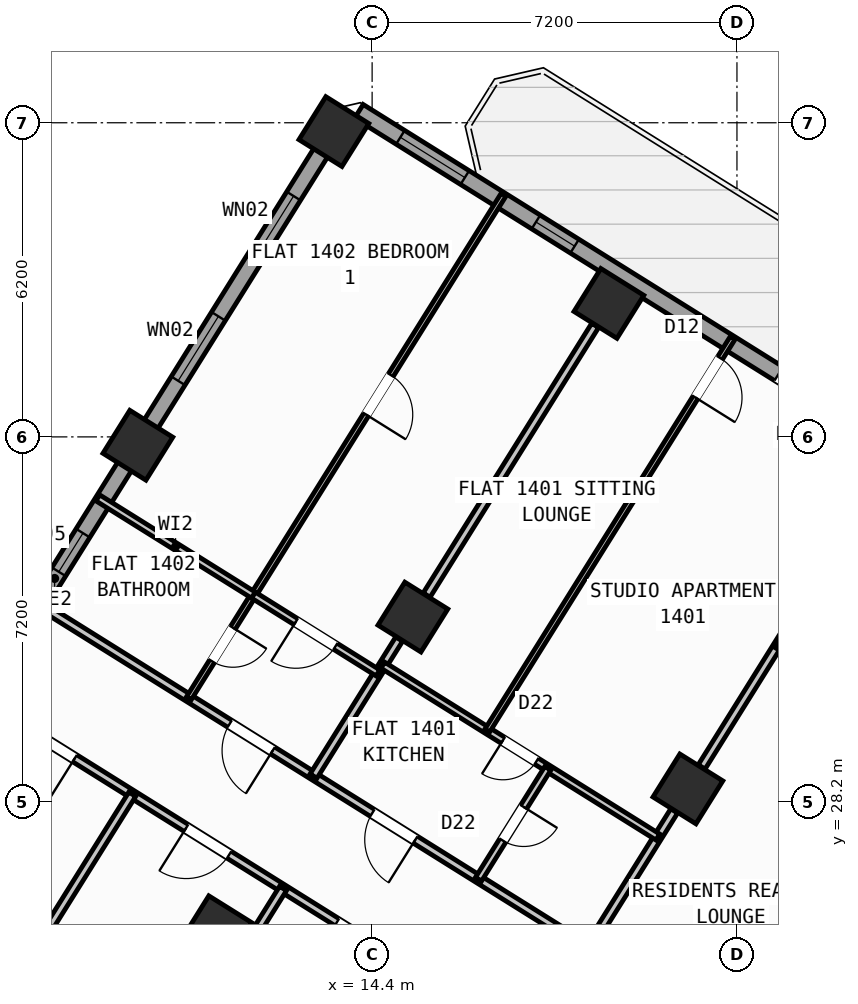
"""IFC4 building model, lengths in metres.
Left out: names, types, materials, properties, quantities, classifications, styles, units other than length and angle.
Written with IfcOpenShell. Run it as: python <this file> out.ifc"""

import sys

from ifc_helpers import new_model, si_unit, direction, frame, frame_2d, origin, origin_2d, place, context, subcontext, project, spatial, rectangle, hollow_rectangle, extrude, source, transform, mapped, element, fill, save


model = new_model("IFC4")
c1 = context("Model", 3, precision=1e-05, world=origin(), true_north=direction((0.0, 1.0)))
c2 = subcontext(c1, "Body", "Model", "MODEL_VIEW")
j1 = project(units=[si_unit("LENGTHUNIT", "METRE"), si_unit("PLANEANGLEUNIT", "RADIAN")], contexts=[c1])
p1 = place(None, origin())
s1 = spatial("IfcSite", under=j1, at=p1, CompositionType="ELEMENT")
p2 = place(p1, origin())
s2 = spatial("IfcBuilding", under=s1, at=p2, CompositionType="ELEMENT")
p3 = place(p2, frame((0.0, 0.0, 56.4)))
s3 = spatial("IfcBuildingStorey", under=s2, at=p3, CompositionType="ELEMENT", Elevation=56.4)
m1 = source(origin(), c2, "Body", "SweptSolid", [
    extrude(hollow_rectangle(XDim=1.0, YDim=1.0, WallThickness=0.04, at=origin_2d()), origin(), (0.0, 0.0, 1.0), 3.6),
])
for number, where, z_axis, x_axis in (
    (1, (20.632, 28.452, 0.0), (0.0, 0.0, 1.0), (-0.848, 0.53, 0.0)),
    (2, (19.073, 38.034, 0.0), (0.0, 0.0, 1.0), (-0.848, 0.53, 0.0)),
    (3, (15.205, 31.844, 0.0), (0.0, 0.0, 1.0), (-0.848, 0.53, 0.0)),
    (4, (11.336, 25.653, 0.0), (0.0, 0.0, 1.0), (-0.848, 0.53, 0.0)),
    (5, (13.646, 41.426, 0.0), (0.0, 0.0, 1.0), (-0.848, 0.53, 0.0)),
    (6, (9.777, 35.235, 0.0), (0.0, 0.0, 1.0), (-0.848, 0.53, 0.0)),
):
    element("IfcColumn", number, at=place(p3, frame(where, z_axis=z_axis, x_axis=x_axis)), inside=s3, PredefinedType="COLUMN", context=c2, shape_type="MappedRepresentation", body=[
        mapped(m1, transform((0.0, 0.0, 0.0), scale=1.0)),
    ])
p4 = place(p3, frame((2.415, 23.452, 0.0), z_axis=(0.0, 0.0, 1.0), x_axis=(0.52991049553, 0.848053575387, 0.0)))
e7 = element("IfcWall", 7, at=p4, inside=s3, PredefinedType="STANDARD", context=c2, shape_type="SweptSolid", body=[
    extrude(rectangle(XDim=21.587, YDim=0.32, at=frame_2d((10.794, 0.0))), origin(), (0.0, 0.0, 1.0), 2.725),
])
p5 = place(p4, frame((2.356, 0.0, 0.8)))
e8 = element("IfcOpeningElement", 8, at=p5, cuts=e7, PredefinedType="OPENING", context=c2, shape_type="SweptSolid", body=[
    extrude(rectangle(XDim=2.1, YDim=1.55, at=frame_2d((1.05, 0.775))), frame((0.0, 0.17, 0.0), z_axis=(0.0, -1.0, 0.0), x_axis=(1.0, 0.0, 0.0)), (0.0, 0.0, 1.0), 0.34),
])
p6 = place(p4, frame((10.949, 0.0, 1.0)))
e9 = element("IfcOpeningElement", 9, at=p6, cuts=e7, PredefinedType="OPENING", context=c2, shape_type="SweptSolid", body=[
    extrude(rectangle(XDim=0.9, YDim=1.25, at=frame_2d((0.45, 0.625))), frame((0.0, 0.17, 0.0), z_axis=(0.0, -1.0, 0.0), x_axis=(1.0, 0.0, 0.0)), (0.0, 0.0, 1.0), 0.34),
])
p7 = place(p4, frame((15.394, 0.0, 0.85)))
e10 = element("IfcOpeningElement", 10, at=p7, cuts=e7, PredefinedType="OPENING", context=c2, shape_type="SweptSolid", body=[
    extrude(rectangle(XDim=1.5, YDim=1.5, at=frame_2d((0.75, 0.75))), frame((0.0, 0.17, 0.0), z_axis=(0.0, -1.0, 0.0), x_axis=(1.0, 0.0, 0.0)), (0.0, 0.0, 1.0), 0.34),
])
p8 = place(p4, frame((18.194, 0.0, 0.85)))
e11 = element("IfcOpeningElement", 11, at=p8, cuts=e7, PredefinedType="OPENING", context=c2, shape_type="SweptSolid", body=[
    extrude(rectangle(XDim=1.5, YDim=1.5, at=frame_2d((0.75, 0.75))), frame((0.0, 0.17, 0.0), z_axis=(0.0, -1.0, 0.0), x_axis=(1.0, 0.0, 0.0)), (0.0, 0.0, 1.0), 0.34),
])
p9 = place(p3, frame((14.138, 41.825, 0.0), z_axis=(0.0, 0.0, 1.0), x_axis=(0.848046498049, -0.529921821731, 0.0)))
e12 = element("IfcWall", 12, at=p9, inside=s3, PredefinedType="STANDARD", context=c2, shape_type="SweptSolid", body=[
    extrude(rectangle(XDim=31.588, YDim=0.32, at=frame_2d((15.794, 0.0))), origin(), (0.0, 0.0, 1.0), 3.35),
])
p10 = place(p9, frame((9.772, 0.0, 0.0)))
e13 = element("IfcOpeningElement", 13, at=p10, cuts=e12, PredefinedType="OPENING", context=c2, shape_type="SweptSolid", body=[
    extrude(rectangle(XDim=1.05, YDim=2.15, at=frame_2d((0.525, 1.075))), frame((0.0, 0.17, 0.0), z_axis=(0.0, -1.0, 0.0), x_axis=(1.0, 0.0, 0.0)), (0.0, 0.0, 1.0), 0.34),
])
p11 = place(p9, frame((0.966, 0.0, 0.85)))
e14 = element("IfcOpeningElement", 14, at=p11, cuts=e12, PredefinedType="OPENING", context=c2, shape_type="SweptSolid", body=[
    extrude(rectangle(XDim=1.5, YDim=1.5, at=frame_2d((0.75, 0.75))), frame((0.0, 0.17, 0.0), z_axis=(0.0, -1.0, 0.0), x_axis=(1.0, 0.0, 0.0)), (0.0, 0.0, 1.0), 0.34),
])
p12 = place(p9, frame((4.121, 0.0, 1.0)))
e15 = element("IfcOpeningElement", 15, at=p12, cuts=e12, PredefinedType="OPENING", context=c2, shape_type="SweptSolid", body=[
    extrude(rectangle(XDim=0.9, YDim=1.25, at=frame_2d((0.45, 0.625))), frame((0.0, 0.17, 0.0), z_axis=(0.0, -1.0, 0.0), x_axis=(1.0, 0.0, 0.0)), (0.0, 0.0, 1.0), 0.34),
])
p13 = place(p9, frame((13.899, 0.0, 0.85)))
e16 = element("IfcOpeningElement", 16, at=p13, cuts=e12, PredefinedType="OPENING", context=c2, shape_type="SweptSolid", body=[
    extrude(rectangle(XDim=1.5, YDim=1.5, at=frame_2d((0.75, 0.75))), frame((0.0, 0.17, 0.0), z_axis=(0.0, -1.0, 0.0), x_axis=(1.0, 0.0, 0.0)), (0.0, 0.0, 1.0), 0.34),
])
p14 = place(p9, frame((22.019, 0.0, 0.95)))
e17 = element("IfcOpeningElement", 17, at=p14, cuts=e12, PredefinedType="OPENING", context=c2, shape_type="SweptSolid", body=[
    extrude(rectangle(XDim=1.2, YDim=1.4, at=frame_2d((0.6, 0.7))), frame((0.0, 0.17, 0.0), z_axis=(0.0, -1.0, 0.0), x_axis=(1.0, 0.0, 0.0)), (0.0, 0.0, 1.0), 0.34),
])
p15 = place(p9, frame((27.569, 0.0, 0.95)))
e18 = element("IfcOpeningElement", 18, at=p15, cuts=e12, PredefinedType="OPENING", context=c2, shape_type="SweptSolid", body=[
    extrude(rectangle(XDim=1.2, YDim=1.4, at=frame_2d((0.6, 0.7))), frame((0.0, 0.17, 0.0), z_axis=(0.0, -1.0, 0.0), x_axis=(1.0, 0.0, 0.0)), (0.0, 0.0, 1.0), 0.34),
])
p16 = place(p3, frame((27.953, 33.016, 0.0), z_axis=(0.0, 0.0, 1.0), x_axis=(-0.529905022231, -0.848056995381, 0.0)))
e19 = element("IfcWall", 19, at=p16, inside=s3, PredefinedType="PARTITIONING", context=c2, shape_type="SweptSolid", body=[
    extrude(rectangle(XDim=11.45, YDim=0.16, at=frame_2d((5.725, 0.0))), origin(), (0.0, 0.0, 1.0), 3.34),
])
p17 = place(p3, frame((21.885, 23.306, 0.0), z_axis=(0.0, 0.0, 1.0), x_axis=(-0.848052408131, 0.529912363569, 0.0)))
e20 = element("IfcWall", 20, at=p17, inside=s3, PredefinedType="PARTITIONING", context=c2, shape_type="SweptSolid", body=[
    extrude(rectangle(XDim=16.73, YDim=0.16, at=frame_2d((8.365, 0.0))), origin(), (0.0, 0.0, 1.0), 3.34),
])
p18 = place(p17, frame((1.395, 0.0, 0.0)))
e21 = element("IfcOpeningElement", 21, at=p18, cuts=e20, PredefinedType="OPENING", context=c2, shape_type="SweptSolid", body=[
    extrude(rectangle(XDim=1.0, YDim=2.1, at=frame_2d((0.5, 1.05))), frame((0.0, 0.09, 0.0), z_axis=(0.0, -1.0, 0.0), x_axis=(1.0, 0.0, 0.0)), (0.0, 0.0, 1.0), 0.18),
])
p19 = place(p17, frame((7.82, 0.0, 0.0)))
e22 = element("IfcOpeningElement", 22, at=p19, cuts=e20, PredefinedType="OPENING", context=c2, shape_type="SweptSolid", body=[
    extrude(rectangle(XDim=1.0, YDim=2.1, at=frame_2d((0.5, 1.05))), frame((0.0, 0.09, 0.0), z_axis=(0.0, -1.0, 0.0), x_axis=(1.0, 0.0, 0.0)), (0.0, 0.0, 1.0), 0.18),
])
p20 = place(p17, frame((11.14, 0.0, 0.0)))
e23 = element("IfcOpeningElement", 23, at=p20, cuts=e20, PredefinedType="OPENING", context=c2, shape_type="SweptSolid", body=[
    extrude(rectangle(XDim=1.0, YDim=2.1, at=frame_2d((0.5, 1.05))), frame((0.0, 0.09, 0.0), z_axis=(0.0, -1.0, 0.0), x_axis=(1.0, 0.0, 0.0)), (0.0, 0.0, 1.0), 0.18),
])
p21 = place(p3, frame((20.719, 21.44, 0.0), z_axis=(0.0, 0.0, 1.0), x_axis=(-0.848048310262, 0.529918921593, 0.0)))
e24 = element("IfcWall", 24, at=p21, inside=s3, PredefinedType="PARTITIONING", context=c2, shape_type="SweptSolid", body=[
    extrude(rectangle(XDim=16.73, YDim=0.16, at=frame_2d((8.365, 0.0))), origin(), (0.0, 0.0, 1.0), 3.34),
])
p22 = place(p21, frame((0.92, 0.0, 0.0)))
e25 = element("IfcOpeningElement", 25, at=p22, cuts=e24, PredefinedType="OPENING", context=c2, shape_type="SweptSolid", body=[
    extrude(rectangle(XDim=1.0, YDim=2.1, at=frame_2d((0.5, 1.05))), frame((0.0, 0.09, 0.0), z_axis=(0.0, -1.0, 0.0), x_axis=(1.0, 0.0, 0.0)), (0.0, 0.0, 1.0), 0.18),
])
p23 = place(p21, frame((4.408, 0.0, 0.0)))
e26 = element("IfcOpeningElement", 26, at=p23, cuts=e24, PredefinedType="OPENING", context=c2, shape_type="SweptSolid", body=[
    extrude(rectangle(XDim=1.0, YDim=2.1, at=frame_2d((0.5, 1.05))), frame((0.0, 0.09, 0.0), z_axis=(0.0, -1.0, 0.0), x_axis=(1.0, 0.0, 0.0)), (0.0, 0.0, 1.0), 0.18),
])
p24 = place(p21, frame((7.271, 0.0, 0.0)))
e27 = element("IfcOpeningElement", 27, at=p24, cuts=e24, PredefinedType="OPENING", context=c2, shape_type="SweptSolid", body=[
    extrude(rectangle(XDim=1.0, YDim=2.1, at=frame_2d((0.5, 1.05))), frame((0.0, 0.09, 0.0), z_axis=(0.0, -1.0, 0.0), x_axis=(1.0, 0.0, 0.0)), (0.0, 0.0, 1.0), 0.18),
])
p25 = place(p21, frame((10.78, 0.0, 0.0)))
e28 = element("IfcOpeningElement", 28, at=p25, cuts=e24, PredefinedType="OPENING", context=c2, shape_type="SweptSolid", body=[
    extrude(rectangle(XDim=1.0, YDim=2.1, at=frame_2d((0.5, 1.05))), frame((0.0, 0.09, 0.0), z_axis=(0.0, -1.0, 0.0), x_axis=(1.0, 0.0, 0.0)), (0.0, 0.0, 1.0), 0.18),
])
p26 = place(p21, frame((14.372, 0.0, 0.0)))
e29 = element("IfcOpeningElement", 29, at=p26, cuts=e24, PredefinedType="OPENING", context=c2, shape_type="SweptSolid", body=[
    extrude(rectangle(XDim=1.0, YDim=2.1, at=frame_2d((0.5, 1.05))), frame((0.0, 0.09, 0.0), z_axis=(0.0, -1.0, 0.0), x_axis=(1.0, 0.0, 0.0)), (0.0, 0.0, 1.0), 0.18),
])
p27 = place(p3, frame((12.642, 26.488, 0.0), z_axis=(0.0, 0.0, 1.0), x_axis=(-0.529914428959, -0.848051117552, 0.0)))
e30 = element("IfcWall", 30, at=p27, inside=s3, PredefinedType="PARTITIONING", context=c2, shape_type="SweptSolid", body=[
    extrude(rectangle(XDim=8.05, YDim=0.16, at=frame_2d((4.025, 0.0))), origin(), (0.0, 0.0, 1.0), 3.34),
])
p28 = place(p3, frame((9.666, 28.347, 0.0), z_axis=(0.0, 0.0, 1.0), x_axis=(-0.529928058306, -0.848042600947, 0.0)))
e31 = element("IfcWall", 31, at=p28, inside=s3, PredefinedType="PARTITIONING", context=c2, shape_type="SweptSolid", body=[
    extrude(rectangle(XDim=8.05, YDim=0.16, at=frame_2d((4.025, 0.0))), origin(), (0.0, 0.0, 1.0), 3.34),
])
p29 = place(p3, frame((24.229, 34.209, 0.0), z_axis=(0.0, 0.0, 1.0), x_axis=(-0.529897533635, -0.848061674554, 0.0)))
e32 = element("IfcWall", 32, at=p29, inside=s3, PredefinedType="PARTITIONING", context=c2, shape_type="SweptSolid", body=[
    extrude(rectangle(XDim=6.276, YDim=0.16, at=frame_2d((3.138, 0.0))), origin(), (0.0, 0.0, 1.0), 2.725),
])
p30 = place(p3, frame((20.361, 28.018, 0.0), z_axis=(0.0, 0.0, 1.0), x_axis=(-0.529875025416, -0.848075738033, 0.0)))
e33 = element("IfcWall", 33, at=p30, inside=s3, PredefinedType="PARTITIONING", context=c2, shape_type="SweptSolid", body=[
    extrude(rectangle(XDim=3.188, YDim=0.16, at=frame_2d((1.594, 0.0))), origin(), (0.0, 0.0, 1.0), 2.725),
])
p31 = place(p3, frame((25.612, 29.269, 0.0), z_axis=(0.0, 0.0, 1.0), x_axis=(-0.84803087207, 0.529946827537, 0.0)))
e34 = element("IfcWall", 34, at=p31, inside=s3, PredefinedType="PARTITIONING", context=c2, shape_type="SweptSolid", body=[
    extrude(rectangle(XDim=3.79, YDim=0.11, at=frame_2d((1.895, 0.0))), origin(), (0.0, 0.0, 1.0), 3.34),
])
p32 = place(p31, frame((1.435, 0.0, 0.0)))
e35 = element("IfcOpeningElement", 35, at=p32, cuts=e34, PredefinedType="OPENING", context=c2, shape_type="SweptSolid", body=[
    extrude(rectangle(XDim=0.92, YDim=2.08, at=frame_2d((0.46, 1.04))), frame((0.0, 0.065, 0.0), z_axis=(0.0, -1.0, 0.0), x_axis=(1.0, 0.0, 0.0)), (0.0, 0.0, 1.0), 0.13),
])
p33 = place(p3, frame((18.802, 37.6, 0.0), z_axis=(0.0, 0.0, 1.0), x_axis=(-0.529915015264, -0.848050751193, 0.0)))
e36 = element("IfcWall", 36, at=p33, inside=s3, PredefinedType="PARTITIONING", context=c2, shape_type="SweptSolid", body=[
    extrude(rectangle(XDim=6.276, YDim=0.16, at=frame_2d((3.138, 0.0))), origin(), (0.0, 0.0, 1.0), 2.725),
])
p34 = place(p3, frame((14.933, 31.409, 0.0), z_axis=(0.0, 0.0, 1.0), x_axis=(-0.529875025416, -0.848075738033, 0.0)))
e37 = element("IfcWall", 37, at=p34, inside=s3, PredefinedType="PARTITIONING", context=c2, shape_type="SweptSolid", body=[
    extrude(rectangle(XDim=3.188, YDim=0.16, at=frame_2d((1.594, 0.0))), origin(), (0.0, 0.0, 1.0), 2.725),
])
p35 = place(p3, frame((20.039, 27.502, 0.0), z_axis=(0.0, 0.0, 1.0), x_axis=(-0.848039019877, 0.529933789039, 0.0)))
e38 = element("IfcWall", 38, at=p35, inside=s3, PredefinedType="PLUMBINGWALL", context=c2, shape_type="SweptSolid", body=[
    extrude(rectangle(XDim=6.4, YDim=0.14, at=frame_2d((3.2, 0.0))), origin(), (0.0, 0.0, 1.0), 3.34),
])
p36 = place(p35, frame((2.824, 0.0, 0.0)))
e39 = element("IfcOpeningElement", 39, at=p36, cuts=e38, PredefinedType="OPENING", context=c2, shape_type="SweptSolid", body=[
    extrude(rectangle(XDim=0.78, YDim=2.05, at=frame_2d((0.39, 1.025))), frame((0.0, 0.08, 0.0), z_axis=(0.0, -1.0, 0.0), x_axis=(1.0, 0.0, 0.0)), (0.0, 0.0, 1.0), 0.16),
])
p37 = place(p3, frame((17.867, 28.859, 0.0), z_axis=(0.0, 0.0, 1.0), x_axis=(-0.529913878929, -0.848051461244, 0.0)))
e40 = element("IfcWall", 40, at=p37, inside=s3, PredefinedType="PLUMBINGWALL", context=c2, shape_type="SweptSolid", body=[
    extrude(rectangle(XDim=2.58, YDim=0.14, at=frame_2d((1.29, 0.0))), origin(), (0.0, 0.0, 1.0), 3.34),
])
p38 = place(p37, frame((0.9, 0.0, 0.0)))
e41 = element("IfcOpeningElement", 41, at=p38, cuts=e40, PredefinedType="OPENING", context=c2, shape_type="SweptSolid", body=[
    extrude(rectangle(XDim=0.78, YDim=2.05, at=frame_2d((0.39, 1.025))), frame((0.0, 0.08, 0.0), z_axis=(0.0, -1.0, 0.0), x_axis=(1.0, 0.0, 0.0)), (0.0, 0.0, 1.0), 0.16),
])
p39 = place(p3, frame((21.517, 37.356, 0.0), z_axis=(0.0, 0.0, 1.0), x_axis=(-0.529919705034, -0.848047820713, 0.0)))
e42 = element("IfcWall", 42, at=p39, inside=s3, PredefinedType="PARTITIONING", context=c2, shape_type="SweptSolid", body=[
    extrude(rectangle(XDim=9.14, YDim=0.11, at=frame_2d((4.57, 0.0))), origin(), (0.0, 0.0, 1.0), 3.34),
])
p40 = place(p39, frame((0.47, 0.0, 0.0)))
e43 = element("IfcOpeningElement", 43, at=p40, cuts=e42, PredefinedType="OPENING", context=c2, shape_type="SweptSolid", body=[
    extrude(rectangle(XDim=0.92, YDim=2.08, at=frame_2d((0.46, 1.04))), frame((0.0, 0.065, 0.0), z_axis=(0.0, -1.0, 0.0), x_axis=(1.0, 0.0, 0.0)), (0.0, 0.0, 1.0), 0.13),
])
p41 = place(p3, frame((16.995, 40.182, 0.0), z_axis=(0.0, 0.0, 1.0), x_axis=(-0.529927783988, -0.848042772363, 0.0)))
e44 = element("IfcWall", 44, at=p41, inside=s3, PredefinedType="PARTITIONING", context=c2, shape_type="SweptSolid", body=[
    extrude(rectangle(XDim=11.72, YDim=0.11, at=frame_2d((5.86, 0.0))), origin(), (0.0, 0.0, 1.0), 3.34),
])
p42 = place(p41, frame((10.08, 0.0, 0.0)))
e45 = element("IfcOpeningElement", 45, at=p42, cuts=e44, PredefinedType="OPENING", context=c2, shape_type="SweptSolid", body=[
    extrude(rectangle(XDim=0.78, YDim=2.05, at=frame_2d((0.39, 1.025))), frame((0.0, 0.065, 0.0), z_axis=(0.0, -1.0, 0.0), x_axis=(1.0, 0.0, 0.0)), (0.0, 0.0, 1.0), 0.13),
])
p43 = place(p41, frame((4.2, 0.0, 0.0)))
e46 = element("IfcOpeningElement", 46, at=p43, cuts=e44, PredefinedType="OPENING", context=c2, shape_type="SweptSolid", body=[
    extrude(rectangle(XDim=0.92, YDim=2.08, at=frame_2d((0.46, 1.04))), frame((0.0, 0.065, 0.0), z_axis=(0.0, -1.0, 0.0), x_axis=(1.0, 0.0, 0.0)), (0.0, 0.0, 1.0), 0.13),
])
p44 = place(p3, frame((14.516, 30.741, 0.0), z_axis=(0.0, 0.0, 1.0), x_axis=(-0.848059786386, 0.529900555496, 0.0)))
e47 = element("IfcWall", 47, at=p44, inside=s3, PredefinedType="PLUMBINGWALL", context=c2, shape_type="SweptSolid", body=[
    extrude(rectangle(XDim=2.9, YDim=0.14, at=frame_2d((1.45, 0.0))), origin(), (0.0, 0.0, 1.0), 3.34),
])
p45 = place(p44, frame((0.99, 0.0, 0.0)))
e48 = element("IfcOpeningElement", 48, at=p45, cuts=e47, PredefinedType="OPENING", context=c2, shape_type="SweptSolid", body=[
    extrude(rectangle(XDim=0.92, YDim=2.08, at=frame_2d((0.46, 1.04))), frame((0.0, 0.08, 0.0), z_axis=(0.0, -1.0, 0.0), x_axis=(1.0, 0.0, 0.0)), (0.0, 0.0, 1.0), 0.16),
])
p46 = place(p3, frame((12.056, 32.278, 0.0), z_axis=(0.0, 0.0, 1.0), x_axis=(-0.848039976902, 0.529932257535, 0.0)))
e49 = element("IfcWall", 49, at=p46, inside=s3, PredefinedType="PLUMBINGWALL", context=c2, shape_type="SweptSolid", body=[
    extrude(rectangle(XDim=3.62, YDim=0.14, at=frame_2d((1.81, 0.0))), origin(), (0.0, 0.0, 1.0), 3.34),
])
m2 = source(origin(), c2, "Body", "SweptSolid", [
    extrude(rectangle(XDim=1.05, YDim=2.15, at=frame_2d((0.525, 1.075))), frame((0.0, 0.025, 0.0), z_axis=(0.0, -1.0, 0.0), x_axis=(1.0, 0.0, 0.0)), (0.0, 0.0, 1.0), 0.05),
])
p47 = place(p10, origin())
e50 = element("IfcDoor", 50, at=p47, inside=s3, OperationType="SINGLE_SWING_RIGHT", PredefinedType="DOOR", context=c2, shape_type="MappedRepresentation", body=[
    mapped(m2, transform((0.0, 0.0, 0.0), scale=1.0)),
])
fill(e13, e50)
m3 = source(origin(), c2, "Body", "SweptSolid", [
    extrude(rectangle(XDim=0.9, YDim=1.25, at=frame_2d((0.45, 0.625))), frame((0.0, 0.03, 0.0), z_axis=(0.0, -1.0, 0.0), x_axis=(1.0, 0.0, 0.0)), (0.0, 0.0, 1.0), 0.06),
])
p48 = place(p6, origin())
e51 = element("IfcWindow", 51, at=p48, inside=s3, PartitioningType="SINGLE_PANEL", PredefinedType="WINDOW", context=c2, shape_type="MappedRepresentation", body=[
    mapped(m3, transform((0.0, 0.0, 0.0), scale=1.0)),
])
fill(e9, e51)
m4 = source(origin(), c2, "Body", "SweptSolid", [
    extrude(rectangle(XDim=1.5, YDim=1.5, at=frame_2d((0.75, 0.75))), frame((0.0, 0.03, 0.0), z_axis=(0.0, -1.0, 0.0), x_axis=(1.0, 0.0, 0.0)), (0.0, 0.0, 1.0), 0.06),
])
p49 = place(p7, origin())
e52 = element("IfcWindow", 52, at=p49, inside=s3, PartitioningType="SINGLE_PANEL", PredefinedType="WINDOW", context=c2, shape_type="MappedRepresentation", body=[
    mapped(m4, transform((0.0, 0.0, 0.0), scale=1.0)),
])
fill(e10, e52)
p50 = place(p8, origin())
e53 = element("IfcWindow", 53, at=p50, inside=s3, PartitioningType="SINGLE_PANEL", PredefinedType="WINDOW", context=c2, shape_type="MappedRepresentation", body=[
    mapped(m4, transform((0.0, 0.0, 0.0), scale=1.0)),
])
fill(e11, e53)
p51 = place(p11, origin())
e54 = element("IfcWindow", 54, at=p51, inside=s3, PartitioningType="SINGLE_PANEL", PredefinedType="WINDOW", context=c2, shape_type="MappedRepresentation", body=[
    mapped(m4, transform((0.0, 0.0, 0.0), scale=1.0)),
])
fill(e14, e54)
p52 = place(p12, origin())
e55 = element("IfcWindow", 55, at=p52, inside=s3, PartitioningType="SINGLE_PANEL", PredefinedType="WINDOW", context=c2, shape_type="MappedRepresentation", body=[
    mapped(m3, transform((0.0, 0.0, 0.0), scale=1.0)),
])
fill(e15, e55)
m5 = source(origin(), c2, "Body", "SweptSolid", [
    extrude(rectangle(XDim=1.0, YDim=2.1, at=frame_2d((0.5, 1.05))), frame((0.0, 0.025, 0.0), z_axis=(0.0, -1.0, 0.0), x_axis=(1.0, 0.0, 0.0)), (0.0, 0.0, 1.0), 0.05),
])
p53 = place(p24, origin())
e56 = element("IfcDoor", 56, at=p53, inside=s3, OperationType="SINGLE_SWING_LEFT", PredefinedType="DOOR", context=c2, shape_type="MappedRepresentation", body=[
    mapped(m5, transform((0.0, 0.0, 0.0), scale=1.0)),
])
fill(e27, e56)
p54 = place(p25, origin())
e57 = element("IfcDoor", 57, at=p54, inside=s3, OperationType="SINGLE_SWING_RIGHT", PredefinedType="DOOR", context=c2, shape_type="MappedRepresentation", body=[
    mapped(m5, transform((0.0, 0.0, 0.0), scale=1.0)),
])
fill(e28, e57)
p55 = place(p26, origin())
e58 = element("IfcDoor", 58, at=p55, inside=s3, OperationType="SINGLE_SWING_LEFT", PredefinedType="DOOR", context=c2, shape_type="MappedRepresentation", body=[
    mapped(m5, transform((0.0, 0.0, 0.0), scale=1.0)),
])
fill(e29, e58)
m6 = source(origin(), c2, "Body", "SweptSolid", [
    extrude(rectangle(XDim=0.92, YDim=2.08, at=frame_2d((0.46, 1.04))), frame((0.0, 0.025, 0.0), z_axis=(0.0, -1.0, 0.0), x_axis=(1.0, 0.0, 0.0)), (0.0, 0.0, 1.0), 0.05),
])
p56 = place(p40, origin())
e59 = element("IfcDoor", 59, at=p56, inside=s3, OperationType="SINGLE_SWING_RIGHT", PredefinedType="DOOR", context=c2, shape_type="MappedRepresentation", body=[
    mapped(m6, transform((0.0, 0.0, 0.0), scale=1.0)),
])
fill(e43, e59)
p57 = place(p19, origin())
e60 = element("IfcDoor", 60, at=p57, inside=s3, OperationType="SINGLE_SWING_LEFT", PredefinedType="DOOR", context=c2, shape_type="MappedRepresentation", body=[
    mapped(m5, transform((0.0, 0.0, 0.0), scale=1.0)),
])
fill(e22, e60)
m7 = source(origin(), c2, "Body", "SweptSolid", [
    extrude(rectangle(XDim=0.78, YDim=2.05, at=frame_2d((0.39, 1.025))), frame((0.0, 0.025, 0.0), z_axis=(0.0, -1.0, 0.0), x_axis=(1.0, 0.0, 0.0)), (0.0, 0.0, 1.0), 0.05),
])
p58 = place(p36, origin())
e61 = element("IfcDoor", 61, at=p58, inside=s3, OperationType="SINGLE_SWING_RIGHT", PredefinedType="DOOR", context=c2, shape_type="MappedRepresentation", body=[
    mapped(m7, transform((0.0, 0.0, 0.0), scale=1.0)),
])
fill(e39, e61)
p59 = place(p38, origin())
e62 = element("IfcDoor", 62, at=p59, inside=s3, OperationType="SINGLE_SWING_LEFT", PredefinedType="DOOR", context=c2, shape_type="MappedRepresentation", body=[
    mapped(m7, transform((0.0, 0.0, 0.0), scale=1.0)),
])
fill(e41, e62)
p60 = place(p20, origin())
e63 = element("IfcDoor", 63, at=p60, inside=s3, OperationType="SINGLE_SWING_LEFT", PredefinedType="DOOR", context=c2, shape_type="MappedRepresentation", body=[
    mapped(m5, transform((0.0, 0.0, 0.0), scale=1.0)),
])
fill(e23, e63)
p61 = place(p45, origin())
e64 = element("IfcDoor", 64, at=p61, inside=s3, OperationType="SINGLE_SWING_RIGHT", PredefinedType="DOOR", context=c2, shape_type="MappedRepresentation", body=[
    mapped(m6, transform((0.0, 0.0, 0.0), scale=1.0)),
])
fill(e48, e64)
p62 = place(p42, origin())
e65 = element("IfcDoor", 65, at=p62, inside=s3, OperationType="SINGLE_SWING_LEFT", PredefinedType="DOOR", context=c2, shape_type="MappedRepresentation", body=[
    mapped(m7, transform((0.0, 0.0, 0.0), scale=1.0)),
])
fill(e45, e65)
p63 = place(p43, origin())
e66 = element("IfcDoor", 66, at=p63, inside=s3, OperationType="SINGLE_SWING_RIGHT", PredefinedType="DOOR", context=c2, shape_type="MappedRepresentation", body=[
    mapped(m6, transform((0.0, 0.0, 0.0), scale=1.0)),
])
fill(e46, e66)
save(model, sys.argv[1])
